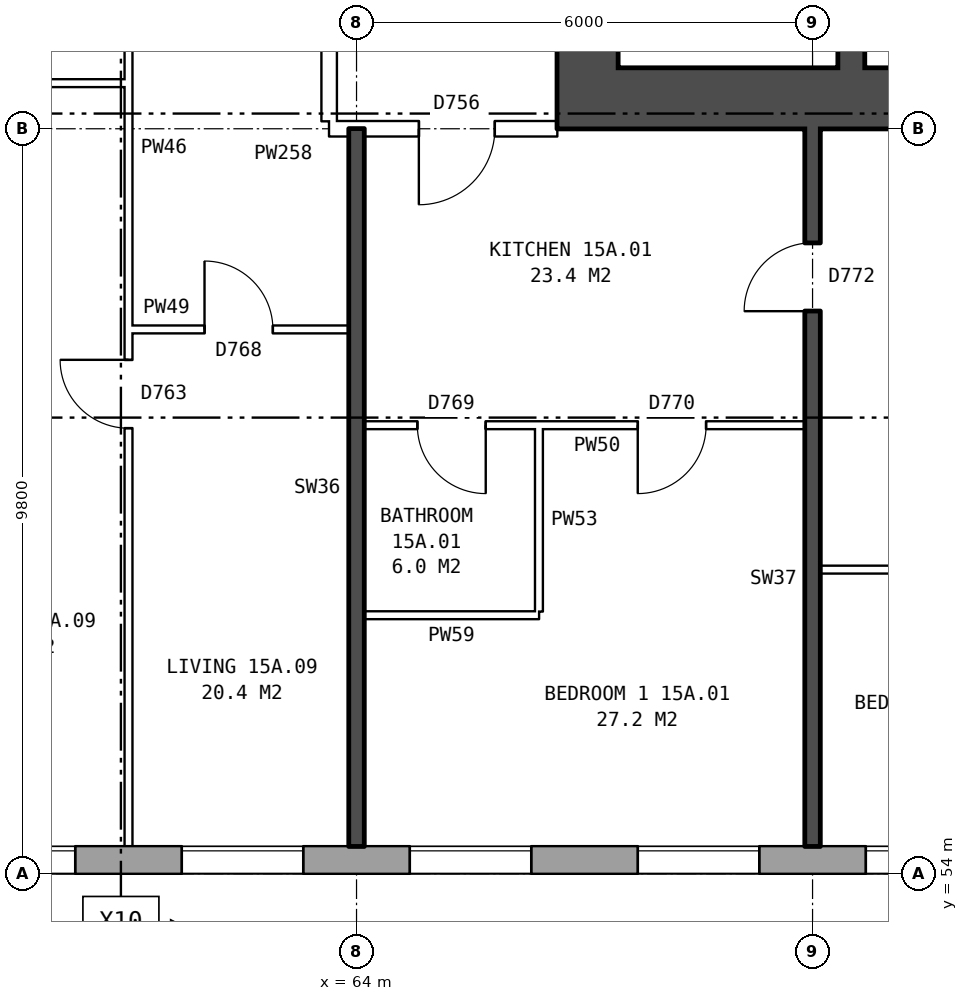
"""IFC4 building model, lengths in metres.
Left out: names, types, materials, properties, quantities, classifications, styles, units other than length and angle.
Written with IfcOpenShell. Run it as: python <this file> out.ifc"""

import sys

from ifc_helpers import new_model, si_unit, direction, frame, frame_2d, origin, place, context, subcontext, project, spatial, rectangle, extrude, element, fill, save


model = new_model("IFC4")
c1 = context("Model", 3, precision=1e-05, world=origin(), true_north=direction((0.0, 1.0)))
c2 = subcontext(c1, "Body", "Model", "MODEL_VIEW")
j1 = project(units=[si_unit("LENGTHUNIT", "METRE"), si_unit("PLANEANGLEUNIT", "RADIAN")], contexts=[c1])
p1 = place(None, origin())
s1 = spatial("IfcSite", under=j1, at=p1, CompositionType="ELEMENT")
p2 = place(p1, origin())
s2 = spatial("IfcBuilding", under=s1, at=p2, CompositionType="ELEMENT")
p3 = place(p2, frame((0.0, 0.0, 56.7)))
s3 = spatial("IfcBuildingStorey", under=s2, at=p3, CompositionType="ELEMENT", Elevation=56.7)
p4 = place(p3, frame((24.575, 54.18, 0.0), z_axis=(0.0, 0.0, 1.0), x_axis=(1.0, 0.0, 0.0)))
e1 = element("IfcWall", 1, at=p4, inside=s3, PredefinedType="STANDARD", context=c2, shape_type="SweptSolid", body=[
    extrude(rectangle(XDim=48.351, YDim=0.36, at=frame_2d((24.175, 0.0))), origin(), (0.0, 0.0, 1.0), 2.85),
])
p5 = place(p4, frame((1.125, 0.0, 0.8)))
e2 = element("IfcOpeningElement", 2, at=p5, cuts=e1, PredefinedType="OPENING", context=c2, shape_type="SweptSolid", body=[
    extrude(rectangle(XDim=1.6, YDim=1.8, at=frame_2d((0.8, 0.9))), frame((0.0, 0.19, 0.0), z_axis=(0.0, -1.0, 0.0), x_axis=(1.0, 0.0, 0.0)), (0.0, 0.0, 1.0), 0.38),
])
p6 = place(p4, frame((4.125, 0.0, 0.8)))
e3 = element("IfcOpeningElement", 3, at=p6, cuts=e1, PredefinedType="OPENING", context=c2, shape_type="SweptSolid", body=[
    extrude(rectangle(XDim=1.6, YDim=1.8, at=frame_2d((0.8, 0.9))), frame((0.0, 0.19, 0.0), z_axis=(0.0, -1.0, 0.0), x_axis=(1.0, 0.0, 0.0)), (0.0, 0.0, 1.0), 0.38),
])
p7 = place(p4, frame((7.125, 0.0, 0.8)))
e4 = element("IfcOpeningElement", 4, at=p7, cuts=e1, PredefinedType="OPENING", context=c2, shape_type="SweptSolid", body=[
    extrude(rectangle(XDim=1.6, YDim=1.8, at=frame_2d((0.8, 0.9))), frame((0.0, 0.19, 0.0), z_axis=(0.0, -1.0, 0.0), x_axis=(1.0, 0.0, 0.0)), (0.0, 0.0, 1.0), 0.38),
])
p8 = place(p4, frame((10.125, 0.0, 0.8)))
e5 = element("IfcOpeningElement", 5, at=p8, cuts=e1, PredefinedType="OPENING", context=c2, shape_type="SweptSolid", body=[
    extrude(rectangle(XDim=1.6, YDim=1.8, at=frame_2d((0.8, 0.9))), frame((0.0, 0.19, 0.0), z_axis=(0.0, -1.0, 0.0), x_axis=(1.0, 0.0, 0.0)), (0.0, 0.0, 1.0), 0.38),
])
p9 = place(p4, frame((13.125, 0.0, 0.8)))
e6 = element("IfcOpeningElement", 6, at=p9, cuts=e1, PredefinedType="OPENING", context=c2, shape_type="SweptSolid", body=[
    extrude(rectangle(XDim=1.6, YDim=1.8, at=frame_2d((0.8, 0.9))), frame((0.0, 0.19, 0.0), z_axis=(0.0, -1.0, 0.0), x_axis=(1.0, 0.0, 0.0)), (0.0, 0.0, 1.0), 0.38),
])
p10 = place(p4, frame((15.625, 0.0, 1.0)))
e7 = element("IfcOpeningElement", 7, at=p10, cuts=e1, PredefinedType="OPENING", context=c2, shape_type="SweptSolid", body=[
    extrude(rectangle(XDim=0.8, YDim=1.5, at=frame_2d((0.4, 0.75))), frame((0.0, 0.19, 0.0), z_axis=(0.0, -1.0, 0.0), x_axis=(1.0, 0.0, 0.0)), (0.0, 0.0, 1.0), 0.38),
])
p11 = place(p4, frame((16.725, 0.0, 1.6)))
e8 = element("IfcOpeningElement", 8, at=p11, cuts=e1, PredefinedType="OPENING", context=c2, shape_type="SweptSolid", body=[
    extrude(rectangle(XDim=0.6, YDim=0.9, at=frame_2d((0.3, 0.45))), frame((0.0, 0.19, 0.0), z_axis=(0.0, -1.0, 0.0), x_axis=(1.0, 0.0, 0.0)), (0.0, 0.0, 1.0), 0.38),
])
p12 = place(p4, frame((22.125, 0.0, 0.8)))
e9 = element("IfcOpeningElement", 9, at=p12, cuts=e1, PredefinedType="OPENING", context=c2, shape_type="SweptSolid", body=[
    extrude(rectangle(XDim=1.6, YDim=1.8, at=frame_2d((0.8, 0.9))), frame((0.0, 0.19, 0.0), z_axis=(0.0, -1.0, 0.0), x_axis=(1.0, 0.0, 0.0)), (0.0, 0.0, 1.0), 0.38),
])
p13 = place(p4, frame((25.125, 0.0, 0.8)))
e10 = element("IfcOpeningElement", 10, at=p13, cuts=e1, PredefinedType="OPENING", context=c2, shape_type="SweptSolid", body=[
    extrude(rectangle(XDim=1.6, YDim=1.8, at=frame_2d((0.8, 0.9))), frame((0.0, 0.19, 0.0), z_axis=(0.0, -1.0, 0.0), x_axis=(1.0, 0.0, 0.0)), (0.0, 0.0, 1.0), 0.38),
])
p14 = place(p4, frame((27.625, 0.0, 0.35)))
e11 = element("IfcOpeningElement", 11, at=p14, cuts=e1, PredefinedType="OPENING", context=c2, shape_type="SweptSolid", body=[
    extrude(rectangle(XDim=1.2, YDim=1.8, at=frame_2d((0.6, 0.9))), frame((0.0, 0.19, 0.0), z_axis=(0.0, -1.0, 0.0), x_axis=(1.0, 0.0, 0.0)), (0.0, 0.0, 1.0), 0.38),
])
p15 = place(p4, frame((30.875, 0.0, 1.7)))
e12 = element("IfcOpeningElement", 12, at=p15, cuts=e1, PredefinedType="OPENING", context=c2, shape_type="SweptSolid", body=[
    extrude(rectangle(XDim=1.0, YDim=0.9, at=frame_2d((0.5, 0.45))), frame((0.0, 0.19, 0.0), z_axis=(0.0, -1.0, 0.0), x_axis=(1.0, 0.0, 0.0)), (0.0, 0.0, 1.0), 0.38),
])
p16 = place(p4, frame((34.125, 0.0, 0.8)))
e13 = element("IfcOpeningElement", 13, at=p16, cuts=e1, PredefinedType="OPENING", context=c2, shape_type="SweptSolid", body=[
    extrude(rectangle(XDim=1.6, YDim=1.8, at=frame_2d((0.8, 0.9))), frame((0.0, 0.19, 0.0), z_axis=(0.0, -1.0, 0.0), x_axis=(1.0, 0.0, 0.0)), (0.0, 0.0, 1.0), 0.38),
])
p17 = place(p4, frame((37.125, 0.0, 0.8)))
e14 = element("IfcOpeningElement", 14, at=p17, cuts=e1, PredefinedType="OPENING", context=c2, shape_type="SweptSolid", body=[
    extrude(rectangle(XDim=1.6, YDim=1.8, at=frame_2d((0.8, 0.9))), frame((0.0, 0.19, 0.0), z_axis=(0.0, -1.0, 0.0), x_axis=(1.0, 0.0, 0.0)), (0.0, 0.0, 1.0), 0.38),
])
p18 = place(p4, frame((40.125, 0.0, 0.8)))
e15 = element("IfcOpeningElement", 15, at=p18, cuts=e1, PredefinedType="OPENING", context=c2, shape_type="SweptSolid", body=[
    extrude(rectangle(XDim=1.6, YDim=1.8, at=frame_2d((0.8, 0.9))), frame((0.0, 0.19, 0.0), z_axis=(0.0, -1.0, 0.0), x_axis=(1.0, 0.0, 0.0)), (0.0, 0.0, 1.0), 0.38),
])
p19 = place(p4, frame((43.125, 0.0, 0.8)))
e16 = element("IfcOpeningElement", 16, at=p19, cuts=e1, PredefinedType="OPENING", context=c2, shape_type="SweptSolid", body=[
    extrude(rectangle(XDim=1.6, YDim=1.8, at=frame_2d((0.8, 0.9))), frame((0.0, 0.19, 0.0), z_axis=(0.0, -1.0, 0.0), x_axis=(1.0, 0.0, 0.0)), (0.0, 0.0, 1.0), 0.38),
])
p20 = place(p4, frame((46.125, 0.0, 0.8)))
e17 = element("IfcOpeningElement", 17, at=p20, cuts=e1, PredefinedType="OPENING", context=c2, shape_type="SweptSolid", body=[
    extrude(rectangle(XDim=1.6, YDim=1.8, at=frame_2d((0.8, 0.9))), frame((0.0, 0.19, 0.0), z_axis=(0.0, -1.0, 0.0), x_axis=(1.0, 0.0, 0.0)), (0.0, 0.0, 1.0), 0.38),
])
p21 = place(p4, frame((18.875, 0.0, 0.8)))
e18 = element("IfcOpeningElement", 18, at=p21, cuts=e1, PredefinedType="OPENING", context=c2, shape_type="SweptSolid", body=[
    extrude(rectangle(XDim=1.0, YDim=0.9, at=frame_2d((0.5, 0.45))), frame((0.0, 0.19, 0.0), z_axis=(0.0, -1.0, 0.0), x_axis=(1.0, 0.0, 0.0)), (0.0, 0.0, 1.0), 0.38),
])
p22 = place(p4, frame((20.175, 0.0, 0.8)))
e19 = element("IfcOpeningElement", 19, at=p22, cuts=e1, PredefinedType="OPENING", context=c2, shape_type="SweptSolid", body=[
    extrude(rectangle(XDim=1.0, YDim=1.8, at=frame_2d((0.5, 0.9))), frame((0.0, 0.19, 0.0), z_axis=(0.0, -1.0, 0.0), x_axis=(1.0, 0.0, 0.0)), (0.0, 0.0, 1.0), 0.38),
])
p23 = place(p4, frame((29.125, 0.0, 0.35)))
e20 = element("IfcOpeningElement", 20, at=p23, cuts=e1, PredefinedType="OPENING", context=c2, shape_type="SweptSolid", body=[
    extrude(rectangle(XDim=1.0, YDim=0.9, at=frame_2d((0.5, 0.45))), frame((0.0, 0.19, 0.0), z_axis=(0.0, -1.0, 0.0), x_axis=(1.0, 0.0, 0.0)), (0.0, 0.0, 1.0), 0.38),
])
p24 = place(p4, frame((32.225, 0.0, 0.8)))
e21 = element("IfcOpeningElement", 21, at=p24, cuts=e1, PredefinedType="OPENING", context=c2, shape_type="SweptSolid", body=[
    extrude(rectangle(XDim=1.0, YDim=1.8, at=frame_2d((0.5, 0.9))), frame((0.0, 0.19, 0.0), z_axis=(0.0, -1.0, 0.0), x_axis=(1.0, 0.0, 0.0)), (0.0, 0.0, 1.0), 0.38),
])
p25 = place(p3, frame((67.04, 64.6, 0.0), z_axis=(0.0, 0.0, 1.0), x_axis=(0.0, 1.0, 0.0)))
e22 = element("IfcWall", 22, at=p25, inside=s3, PredefinedType="SHEAR", context=c2, shape_type="SweptSolid", body=[
    extrude(rectangle(XDim=10.8, YDim=0.8, at=frame_2d((5.4, 0.0))), origin(), (0.0, 0.0, 1.0), 2.85),
])
p26 = place(p25, frame((0.525, 0.0, 0.0)))
e23 = element("IfcOpeningElement", 23, at=p26, cuts=e22, PredefinedType="OPENING", context=c2, shape_type="SweptSolid", body=[
    extrude(rectangle(XDim=1.1, YDim=2.1, at=frame_2d((0.55, 1.05))), frame((0.0, 0.41, 0.0), z_axis=(0.0, -1.0, 0.0), x_axis=(1.0, 0.0, 0.0)), (0.0, 0.0, 1.0), 0.82),
])
p27 = place(p25, frame((9.1, 0.0, 0.0)))
e24 = element("IfcOpeningElement", 24, at=p27, cuts=e22, PredefinedType="OPENING", context=c2, shape_type="SweptSolid", body=[
    extrude(rectangle(XDim=1.1, YDim=2.1, at=frame_2d((0.55, 1.05))), frame((0.0, 0.41, 0.0), z_axis=(0.0, -1.0, 0.0), x_axis=(1.0, 0.0, 0.0)), (0.0, 0.0, 1.0), 0.82),
])
p28 = place(p3, frame((66.64, 64.2, 0.0), z_axis=(0.0, 0.0, 1.0), x_axis=(1.0, 0.0, 0.0)))
e25 = element("IfcWall", 25, at=p28, inside=s3, PredefinedType="SHEAR", context=c2, shape_type="SweptSolid", body=[
    extrude(rectangle(XDim=9.0, YDim=0.8, at=frame_2d((4.5, 0.0))), origin(), (0.0, 0.0, 1.0), 2.85),
])
p29 = place(p3, frame((70.51, 64.6, 0.0), z_axis=(0.0, 0.0, 1.0), x_axis=(0.0, 1.0, 0.0)))
e26 = element("IfcWall", 26, at=p29, inside=s3, PredefinedType="SHEAR", context=c2, shape_type="SweptSolid", body=[
    extrude(rectangle(XDim=2.075, YDim=0.35, at=frame_2d((1.038, 0.0))), origin(), (0.0, 0.0, 1.0), 2.85),
])
p30 = place(p3, frame((63.64, 63.9, 0.0), z_axis=(0.0, 0.0, 1.0), x_axis=(0.0, 1.0, 0.0)))
e27 = element("IfcWall", 27, at=p30, inside=s3, PredefinedType="PARTITIONING", context=c2, shape_type="SweptSolid", body=[
    extrude(rectangle(XDim=12.2, YDim=0.2, at=frame_2d((6.1, 0.0))), origin(), (0.0, 0.0, 1.0), 2.85),
])
p31 = place(p30, frame((5.1, 0.0, 0.0)))
e28 = element("IfcOpeningElement", 28, at=p31, cuts=e27, PredefinedType="OPENING", context=c2, shape_type="SweptSolid", body=[
    extrude(rectangle(XDim=2.0, YDim=2.1, at=frame_2d((1.0, 1.05))), frame((0.0, 0.11, 0.0), z_axis=(0.0, -1.0, 0.0), x_axis=(1.0, 0.0, 0.0)), (0.0, 0.0, 1.0), 0.22),
])
p32 = place(p3, frame((64.1, 57.4, 0.0), z_axis=(0.0, 0.0, 1.0), x_axis=(1.0, 0.0, 0.0)))
e29 = element("IfcWall", 29, at=p32, inside=s3, PredefinedType="PARTITIONING", context=c2, shape_type="SweptSolid", body=[
    extrude(rectangle(XDim=2.3, YDim=0.1, at=frame_2d((1.15, 0.0))), origin(), (0.0, 0.0, 1.0), 2.85),
])
p33 = place(p3, frame((70.1, 58.0, 0.0), z_axis=(0.0, 0.0, 1.0), x_axis=(1.0, 0.0, 0.0)))
e30 = element("IfcWall", 30, at=p33, inside=s3, PredefinedType="PARTITIONING", context=c2, shape_type="SweptSolid", body=[
    extrude(rectangle(XDim=5.54, YDim=0.1, at=frame_2d((2.77, 0.0))), origin(), (0.0, 0.0, 1.0), 2.85),
])
p34 = place(p33, frame((2.32, 0.0, 0.0)))
e31 = element("IfcOpeningElement", 31, at=p34, cuts=e30, PredefinedType="OPENING", context=c2, shape_type="SweptSolid", body=[
    extrude(rectangle(XDim=0.9, YDim=2.1, at=frame_2d((0.45, 1.05))), frame((0.0, 0.06, 0.0), z_axis=(0.0, -1.0, 0.0), x_axis=(1.0, 0.0, 0.0)), (0.0, 0.0, 1.0), 0.12),
])
p35 = place(p3, frame((64.1, 59.9, 0.0), z_axis=(0.0, 0.0, 1.0), x_axis=(1.0, 0.0, 0.0)))
e32 = element("IfcWall", 32, at=p35, inside=s3, PredefinedType="PARTITIONING", context=c2, shape_type="SweptSolid", body=[
    extrude(rectangle(XDim=5.8, YDim=0.1, at=frame_2d((2.9, 0.0))), origin(), (0.0, 0.0, 1.0), 2.85),
])
p36 = place(p35, frame((3.6, 0.0, 0.0)))
e33 = element("IfcOpeningElement", 33, at=p36, cuts=e32, PredefinedType="OPENING", context=c2, shape_type="SweptSolid", body=[
    extrude(rectangle(XDim=0.9, YDim=2.1, at=frame_2d((0.45, 1.05))), frame((0.0, 0.06, 0.0), z_axis=(0.0, -1.0, 0.0), x_axis=(1.0, 0.0, 0.0)), (0.0, 0.0, 1.0), 0.12),
])
p37 = place(p35, frame((0.7, 0.0, 0.0)))
e34 = element("IfcOpeningElement", 34, at=p37, cuts=e32, PredefinedType="OPENING", context=c2, shape_type="SweptSolid", body=[
    extrude(rectangle(XDim=0.9, YDim=2.1, at=frame_2d((0.45, 1.05))), frame((0.0, 0.06, 0.0), z_axis=(0.0, -1.0, 0.0), x_axis=(1.0, 0.0, 0.0)), (0.0, 0.0, 1.0), 0.12),
])
p38 = place(p3, frame((61.0, 61.16, 0.0), z_axis=(0.0, 0.0, 1.0), x_axis=(1.0, 0.0, 0.0)))
e35 = element("IfcWall", 35, at=p38, inside=s3, PredefinedType="PARTITIONING", context=c2, shape_type="SweptSolid", body=[
    extrude(rectangle(XDim=2.9, YDim=0.1, at=frame_2d((1.45, 0.0))), origin(), (0.0, 0.0, 1.0), 2.85),
])
p39 = place(p38, frame((1.0, 0.0, 0.0)))
e36 = element("IfcOpeningElement", 36, at=p39, cuts=e35, PredefinedType="OPENING", context=c2, shape_type="SweptSolid", body=[
    extrude(rectangle(XDim=0.9, YDim=2.1, at=frame_2d((0.45, 1.05))), frame((0.0, 0.06, 0.0), z_axis=(0.0, -1.0, 0.0), x_axis=(1.0, 0.0, 0.0)), (0.0, 0.0, 1.0), 0.12),
])
p40 = place(p3, frame((63.64, 63.8, 0.0), z_axis=(0.0, 0.0, 1.0), x_axis=(1.0, 0.0, 0.0)))
e37 = element("IfcWall", 37, at=p40, inside=s3, PredefinedType="PARTITIONING", context=c2, shape_type="SweptSolid", body=[
    extrude(rectangle(XDim=3.0, YDim=0.2, at=frame_2d((1.5, 0.0))), origin(), (0.0, 0.0, 1.0), 2.85),
])
p41 = place(p40, frame((1.18, 0.0, 0.0)))
e38 = element("IfcOpeningElement", 38, at=p41, cuts=e37, PredefinedType="OPENING", context=c2, shape_type="SweptSolid", body=[
    extrude(rectangle(XDim=1.0, YDim=2.1, at=frame_2d((0.5, 1.05))), frame((0.0, 0.11, 0.0), z_axis=(0.0, -1.0, 0.0), x_axis=(1.0, 0.0, 0.0)), (0.0, 0.0, 1.0), 0.22),
])
p42 = place(p3, frame((58.1, 64.4, 0.0), z_axis=(0.0, 0.0, 1.0), x_axis=(1.0, 0.0, 0.0)))
e39 = element("IfcWall", 39, at=p42, inside=s3, PredefinedType="PARTITIONING", context=c2, shape_type="SweptSolid", body=[
    extrude(rectangle(XDim=2.9, YDim=0.1, at=frame_2d((1.45, 0.0))), origin(), (0.0, 0.0, 1.0), 2.85),
])
p43 = place(p3, frame((61.0, 54.36, 0.0), z_axis=(0.0, 0.0, 1.0), x_axis=(0.0, 1.0, 0.0)))
e40 = element("IfcWall", 40, at=p43, inside=s3, PredefinedType="PARTITIONING", context=c2, shape_type="SweptSolid", body=[
    extrude(rectangle(XDim=14.34, YDim=0.1, at=frame_2d((7.17, 0.0))), origin(), (0.0, 0.0, 1.0), 2.85),
])
p44 = place(p43, frame((5.5, 0.0, 0.0)))
e41 = element("IfcOpeningElement", 41, at=p44, cuts=e40, PredefinedType="OPENING", context=c2, shape_type="SweptSolid", body=[
    extrude(rectangle(XDim=0.9, YDim=2.1, at=frame_2d((0.45, 1.05))), frame((0.0, 0.06, 0.0), z_axis=(0.0, -1.0, 0.0), x_axis=(1.0, 0.0, 0.0)), (0.0, 0.0, 1.0), 0.12),
])
p45 = place(p43, frame((12.54, 0.0, 0.0)))
e42 = element("IfcOpeningElement", 42, at=p45, cuts=e40, PredefinedType="OPENING", context=c2, shape_type="SweptSolid", body=[
    extrude(rectangle(XDim=0.9, YDim=2.1, at=frame_2d((0.45, 1.05))), frame((0.0, 0.06, 0.0), z_axis=(0.0, -1.0, 0.0), x_axis=(1.0, 0.0, 0.0)), (0.0, 0.0, 1.0), 0.12),
])
p46 = place(p3, frame((64.0, 54.36, 0.0), z_axis=(0.0, 0.0, 1.0), x_axis=(0.0, 1.0, 0.0)))
e43 = element("IfcWall", 43, at=p46, inside=s3, PredefinedType="SOLIDWALL", context=c2, shape_type="SweptSolid", body=[
    extrude(rectangle(XDim=9.44, YDim=0.2, at=frame_2d((4.72, 0.0))), origin(), (0.0, 0.0, 1.0), 2.85),
])
p47 = place(p3, frame((66.4, 57.45, 0.0), z_axis=(0.0, 0.0, 1.0), x_axis=(0.0, 1.0, 0.0)))
e44 = element("IfcWall", 44, at=p47, inside=s3, PredefinedType="PARTITIONING", context=c2, shape_type="SweptSolid", body=[
    extrude(rectangle(XDim=2.4, YDim=0.1, at=frame_2d((1.2, 0.0))), origin(), (0.0, 0.0, 1.0), 2.85),
])
p48 = place(p3, frame((70.0, 54.36, 0.0), z_axis=(0.0, 0.0, 1.0), x_axis=(0.0, 1.0, 0.0)))
e45 = element("IfcWall", 45, at=p48, inside=s3, PredefinedType="SOLIDWALL", context=c2, shape_type="SweptSolid", body=[
    extrude(rectangle(XDim=9.44, YDim=0.2, at=frame_2d((4.72, 0.0))), origin(), (0.0, 0.0, 1.0), 2.85),
])
p49 = place(p48, frame((7.04, 0.0, 0.0)))
e46 = element("IfcOpeningElement", 46, at=p49, cuts=e45, PredefinedType="OPENING", context=c2, shape_type="SweptSolid", body=[
    extrude(rectangle(XDim=0.9, YDim=2.1, at=frame_2d((0.45, 1.05))), frame((0.0, 0.11, 0.0), z_axis=(0.0, -1.0, 0.0), x_axis=(1.0, 0.0, 0.0)), (0.0, 0.0, 1.0), 0.22),
])
p50 = place(p16, origin())
e47 = element("IfcWindow", 47, at=p50, inside=s3, PartitioningType="SINGLE_PANEL", PredefinedType="WINDOW", context=c2, shape_type="SweptSolid", body=[
    extrude(rectangle(XDim=1.6, YDim=1.8, at=frame_2d((0.8, 0.9))), frame((0.0, 0.15, 0.0), z_axis=(0.0, -1.0, 0.0), x_axis=(1.0, 0.0, 0.0)), (0.0, 0.0, 1.0), 0.06),
])
fill(e13, e47)
p51 = place(p17, origin())
e48 = element("IfcWindow", 48, at=p51, inside=s3, PartitioningType="SINGLE_PANEL", PredefinedType="WINDOW", context=c2, shape_type="SweptSolid", body=[
    extrude(rectangle(XDim=1.6, YDim=1.8, at=frame_2d((0.8, 0.9))), frame((0.0, 0.15, 0.0), z_axis=(0.0, -1.0, 0.0), x_axis=(1.0, 0.0, 0.0)), (0.0, 0.0, 1.0), 0.06),
])
fill(e14, e48)
p52 = place(p18, origin())
e49 = element("IfcWindow", 49, at=p52, inside=s3, PartitioningType="SINGLE_PANEL", PredefinedType="WINDOW", context=c2, shape_type="SweptSolid", body=[
    extrude(rectangle(XDim=1.6, YDim=1.8, at=frame_2d((0.8, 0.9))), frame((0.0, 0.15, 0.0), z_axis=(0.0, -1.0, 0.0), x_axis=(1.0, 0.0, 0.0)), (0.0, 0.0, 1.0), 0.06),
])
fill(e15, e49)
p53 = place(p19, origin())
e50 = element("IfcWindow", 50, at=p53, inside=s3, PartitioningType="SINGLE_PANEL", PredefinedType="WINDOW", context=c2, shape_type="SweptSolid", body=[
    extrude(rectangle(XDim=1.6, YDim=1.8, at=frame_2d((0.8, 0.9))), frame((0.0, 0.15, 0.0), z_axis=(0.0, -1.0, 0.0), x_axis=(1.0, 0.0, 0.0)), (0.0, 0.0, 1.0), 0.06),
])
fill(e16, e50)
p54 = place(p20, origin())
e51 = element("IfcWindow", 51, at=p54, inside=s3, PartitioningType="SINGLE_PANEL", PredefinedType="WINDOW", context=c2, shape_type="SweptSolid", body=[
    extrude(rectangle(XDim=1.6, YDim=1.8, at=frame_2d((0.8, 0.9))), frame((0.0, 0.15, 0.0), z_axis=(0.0, -1.0, 0.0), x_axis=(1.0, 0.0, 0.0)), (0.0, 0.0, 1.0), 0.06),
])
fill(e17, e51)
p55 = place(p36, frame((0.9, 0.0, 0.0), z_axis=(0.0, 0.0, 1.0), x_axis=(-1.0, 0.0, 0.0)))
e52 = element("IfcDoor", 52, at=p55, inside=s3, OperationType="SINGLE_SWING_RIGHT", PredefinedType="DOOR", context=c2, shape_type="SweptSolid", body=[
    extrude(rectangle(XDim=0.9, YDim=2.1, at=frame_2d((0.45, 1.05))), frame((0.0, 0.025, 0.0), z_axis=(0.0, -1.0, 0.0), x_axis=(1.0, 0.0, 0.0)), (0.0, 0.0, 1.0), 0.05),
])
fill(e33, e52)
p56 = place(p41, frame((1.0, 0.0, 0.0), z_axis=(0.0, 0.0, 1.0), x_axis=(-1.0, 0.0, 0.0)))
e53 = element("IfcDoor", 53, at=p56, inside=s3, OperationType="SINGLE_SWING_RIGHT", PredefinedType="DOOR", context=c2, shape_type="SweptSolid", body=[
    extrude(rectangle(XDim=1.0, YDim=2.1, at=frame_2d((0.5, 1.05))), frame((0.0, 0.025, 0.0), z_axis=(0.0, -1.0, 0.0), x_axis=(1.0, 0.0, 0.0)), (0.0, 0.0, 1.0), 0.05),
])
fill(e38, e53)
p57 = place(p49, origin())
e54 = element("IfcDoor", 54, at=p57, inside=s3, OperationType="SINGLE_SWING_LEFT", PredefinedType="DOOR", context=c2, shape_type="SweptSolid", body=[
    extrude(rectangle(XDim=0.9, YDim=2.1, at=frame_2d((0.45, 1.05))), frame((0.0, 0.025, 0.0), z_axis=(0.0, -1.0, 0.0), x_axis=(1.0, 0.0, 0.0)), (0.0, 0.0, 1.0), 0.05),
])
fill(e46, e54)
p58 = place(p37, frame((0.9, 0.0, 0.0), z_axis=(0.0, 0.0, 1.0), x_axis=(-1.0, 0.0, 0.0)))
e55 = element("IfcDoor", 55, at=p58, inside=s3, OperationType="SINGLE_SWING_LEFT", PredefinedType="DOOR", context=c2, shape_type="SweptSolid", body=[
    extrude(rectangle(XDim=0.9, YDim=2.1, at=frame_2d((0.45, 1.05))), frame((0.0, 0.025, 0.0), z_axis=(0.0, -1.0, 0.0), x_axis=(1.0, 0.0, 0.0)), (0.0, 0.0, 1.0), 0.05),
])
fill(e34, e55)
p59 = place(p44, origin())
e56 = element("IfcDoor", 56, at=p59, inside=s3, OperationType="SINGLE_SWING_RIGHT", PredefinedType="DOOR", context=c2, shape_type="SweptSolid", body=[
    extrude(rectangle(XDim=0.9, YDim=2.1, at=frame_2d((0.45, 1.05))), frame((0.0, 0.025, 0.0), z_axis=(0.0, -1.0, 0.0), x_axis=(1.0, 0.0, 0.0)), (0.0, 0.0, 1.0), 0.05),
])
fill(e41, e56)
p60 = place(p39, origin())
e57 = element("IfcDoor", 57, at=p60, inside=s3, OperationType="SINGLE_SWING_LEFT", PredefinedType="DOOR", context=c2, shape_type="SweptSolid", body=[
    extrude(rectangle(XDim=0.9, YDim=2.1, at=frame_2d((0.45, 1.05))), frame((0.0, 0.025, 0.0), z_axis=(0.0, -1.0, 0.0), x_axis=(1.0, 0.0, 0.0)), (0.0, 0.0, 1.0), 0.05),
])
fill(e36, e57)
save(model, sys.argv[1])
